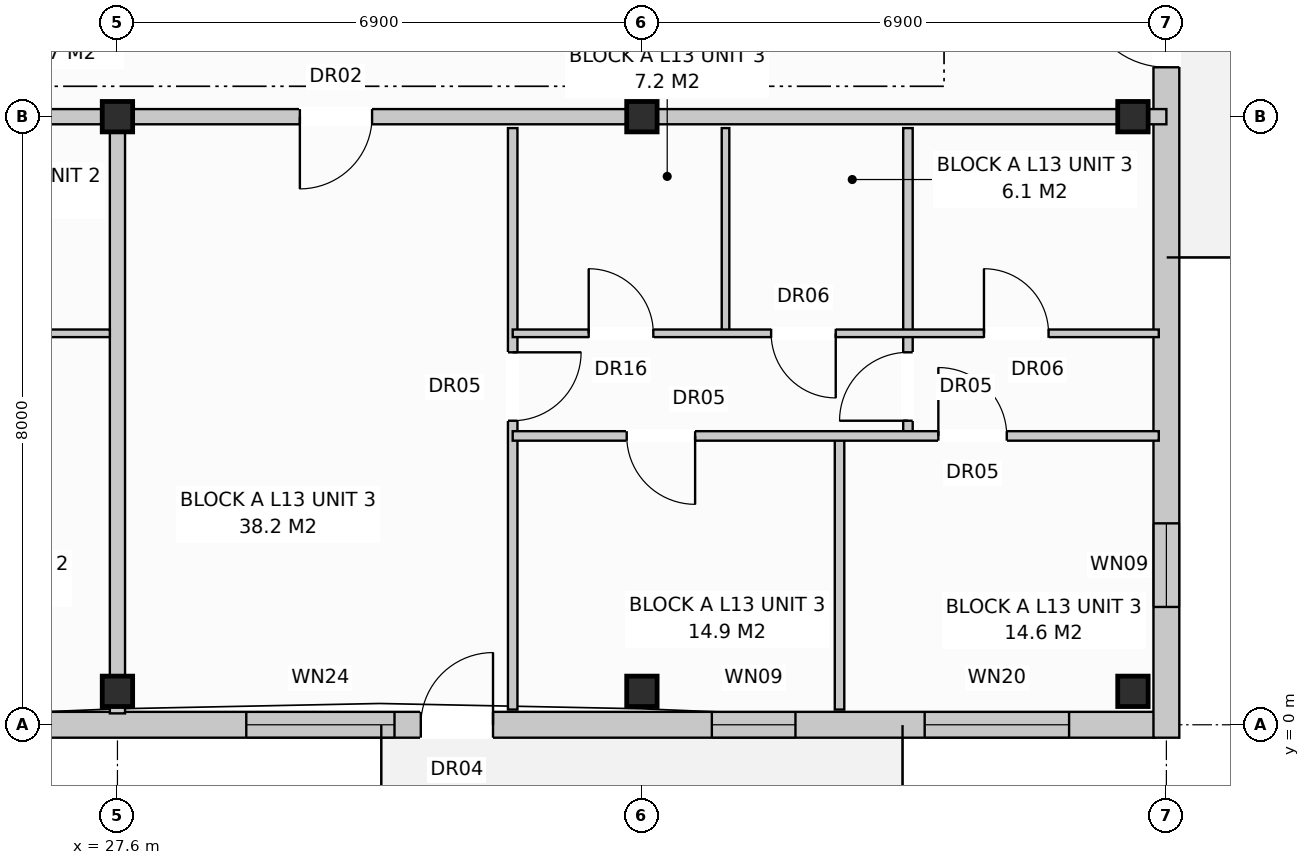
"""IFC4 building model, lengths in metres.
Left out: names, types, materials, properties, quantities, classifications, styles, units other than length and angle.
Written with IfcOpenShell. Run it as: python <this file> out.ifc"""

import sys

from ifc_helpers import new_model, si_unit, direction, frame, frame_2d, origin, origin_with_axes, origin_2d, place, context, subcontext, project, spatial, rectangle, extrude, element, fill, save


model = new_model("IFC4")
c1 = context("Model", 3, precision=1e-05, world=origin(), true_north=direction((0.0, 1.0)))
c2 = subcontext(c1, "Body", "Model", "MODEL_VIEW")
j1 = project(units=[si_unit("LENGTHUNIT", "METRE"), si_unit("PLANEANGLEUNIT", "RADIAN")], contexts=[c1])
p1 = place(None, origin())
s1 = spatial("IfcSite", under=j1, at=p1, CompositionType="ELEMENT")
p2 = place(p1, origin())
s2 = spatial("IfcBuilding", under=s1, at=p2, CompositionType="ELEMENT")
p3 = place(p2, frame((0.0, 0.0, 43.2)))
s3 = spatial("IfcBuildingStorey", under=s2, at=p3, CompositionType="ELEMENT", Elevation=43.2)
for number, where, z_axis, x_axis in (
    (1, (27.6, 0.44, 0.0), (0.0, 0.0, 1.0), (1.0, 0.0, 0.0)),
    (2, (27.6, 8.0, 0.0), (0.0, 0.0, 1.0), (1.0, 0.0, 0.0)),
    (3, (34.5, 0.44, 0.0), (0.0, 0.0, 1.0), (1.0, 0.0, 0.0)),
    (4, (34.5, 8.0, 0.0), (0.0, 0.0, 1.0), (1.0, 0.0, 0.0)),
    (5, (40.96, 0.44, 0.0), (0.0, 0.0, 1.0), (1.0, 0.0, 0.0)),
    (6, (40.96, 8.0, 0.0), (0.0, 0.0, 1.0), (1.0, 0.0, 0.0)),
):
    element("IfcColumn", number, at=place(p3, frame(where, z_axis=z_axis, x_axis=x_axis)), inside=s3, PredefinedType="COLUMN", context=c2, shape_type="SweptSolid", body=[
        extrude(rectangle(XDim=0.4, YDim=0.4, at=origin_2d()), origin(), (0.0, 0.0, 1.0), 3.2),
    ])
p4 = place(p3, frame((0.16, 0.0, 0.0), z_axis=(0.0, 0.0, 1.0), x_axis=(1.0, 0.0, 0.0)))
e7 = element("IfcWall", 7, at=p4, inside=s3, PredefinedType="STANDARD", context=c2, shape_type="SweptSolid", body=[
    extrude(rectangle(XDim=41.08, YDim=0.34, at=frame_2d((20.54, 0.0))), origin(), (0.0, 0.0, 1.0), 2.97),
])
p5 = place(p4, frame((5.11, 0.0, 0.0)))
e8 = element("IfcOpeningElement", 8, at=p5, cuts=e7, PredefinedType="OPENING", context=c2, shape_type="SweptSolid", body=[
    extrude(rectangle(XDim=0.95, YDim=2.1, at=frame_2d((0.475, 1.05))), frame((0.0, 0.182, 0.0), z_axis=(0.0, -1.0, 0.0), x_axis=(1.0, 0.0, 0.0)), (0.0, 0.0, 1.0), 0.364),
])
p6 = place(p4, frame((18.91, 0.0, 0.0)))
e9 = element("IfcOpeningElement", 9, at=p6, cuts=e7, PredefinedType="OPENING", context=c2, shape_type="SweptSolid", body=[
    extrude(rectangle(XDim=0.95, YDim=2.1, at=frame_2d((0.475, 1.05))), frame((0.0, 0.182, 0.0), z_axis=(0.0, -1.0, 0.0), x_axis=(1.0, 0.0, 0.0)), (0.0, 0.0, 1.0), 0.364),
])
p7 = place(p4, frame((31.431, 0.0, 0.0)))
e10 = element("IfcOpeningElement", 10, at=p7, cuts=e7, PredefinedType="OPENING", context=c2, shape_type="SweptSolid", body=[
    extrude(rectangle(XDim=0.95, YDim=2.1, at=frame_2d((0.475, 1.05))), frame((0.0, 0.182, 0.0), z_axis=(0.0, -1.0, 0.0), x_axis=(1.0, 0.0, 0.0)), (0.0, 0.0, 1.0), 0.364),
])
p8 = place(p4, frame((1.11, 0.0, 0.8)))
e11 = element("IfcOpeningElement", 11, at=p8, cuts=e7, PredefinedType="OPENING", context=c2, shape_type="SweptSolid", body=[
    extrude(rectangle(XDim=1.8, YDim=1.7, at=frame_2d((0.9, 0.85))), frame((0.0, 0.182, 0.0), z_axis=(0.0, -1.0, 0.0), x_axis=(1.0, 0.0, 0.0)), (0.0, 0.0, 1.0), 0.364),
])
p9 = place(p4, frame((9.36, 0.0, 0.72)))
e12 = element("IfcOpeningElement", 12, at=p9, cuts=e7, PredefinedType="OPENING", context=c2, shape_type="SweptSolid", body=[
    extrude(rectangle(XDim=1.1, YDim=1.5, at=frame_2d((0.55, 0.75))), frame((0.0, 0.182, 0.0), z_axis=(0.0, -1.0, 0.0), x_axis=(1.0, 0.0, 0.0)), (0.0, 0.0, 1.0), 0.364),
])
p10 = place(p4, frame((14.635, 0.0, 0.8)))
e13 = element("IfcOpeningElement", 13, at=p10, cuts=e7, PredefinedType="OPENING", context=c2, shape_type="SweptSolid", body=[
    extrude(rectangle(XDim=1.95, YDim=1.65, at=frame_2d((0.975, 0.825))), frame((0.0, 0.182, 0.0), z_axis=(0.0, -1.0, 0.0), x_axis=(1.0, 0.0, 0.0)), (0.0, 0.0, 1.0), 0.364),
])
p11 = place(p4, frame((21.46, 0.0, 0.72)))
e14 = element("IfcOpeningElement", 14, at=p11, cuts=e7, PredefinedType="OPENING", context=c2, shape_type="SweptSolid", body=[
    extrude(rectangle(XDim=1.1, YDim=1.5, at=frame_2d((0.55, 0.75))), frame((0.0, 0.182, 0.0), z_axis=(0.0, -1.0, 0.0), x_axis=(1.0, 0.0, 0.0)), (0.0, 0.0, 1.0), 0.364),
])
p12 = place(p4, frame((24.46, 0.0, 0.8)))
e15 = element("IfcOpeningElement", 15, at=p12, cuts=e7, PredefinedType="OPENING", context=c2, shape_type="SweptSolid", body=[
    extrude(rectangle(XDim=1.9, YDim=1.85, at=frame_2d((0.95, 0.925))), frame((0.0, 0.182, 0.0), z_axis=(0.0, -1.0, 0.0), x_axis=(1.0, 0.0, 0.0)), (0.0, 0.0, 1.0), 0.364),
])
p13 = place(p4, frame((29.135, 0.0, 0.8)))
e16 = element("IfcOpeningElement", 16, at=p13, cuts=e7, PredefinedType="OPENING", context=c2, shape_type="SweptSolid", body=[
    extrude(rectangle(XDim=1.95, YDim=1.65, at=frame_2d((0.975, 0.825))), frame((0.0, 0.182, 0.0), z_axis=(0.0, -1.0, 0.0), x_axis=(1.0, 0.0, 0.0)), (0.0, 0.0, 1.0), 0.364),
])
p14 = place(p4, frame((35.26, 0.0, 0.72)))
e17 = element("IfcOpeningElement", 17, at=p14, cuts=e7, PredefinedType="OPENING", context=c2, shape_type="SweptSolid", body=[
    extrude(rectangle(XDim=1.1, YDim=1.5, at=frame_2d((0.55, 0.75))), frame((0.0, 0.182, 0.0), z_axis=(0.0, -1.0, 0.0), x_axis=(1.0, 0.0, 0.0)), (0.0, 0.0, 1.0), 0.364),
])
p15 = place(p4, frame((38.06, 0.0, 0.8)))
e18 = element("IfcOpeningElement", 18, at=p15, cuts=e7, PredefinedType="OPENING", context=c2, shape_type="SweptSolid", body=[
    extrude(rectangle(XDim=1.9, YDim=1.85, at=frame_2d((0.95, 0.925))), frame((0.0, 0.182, 0.0), z_axis=(0.0, -1.0, 0.0), x_axis=(1.0, 0.0, 0.0)), (0.0, 0.0, 1.0), 0.364),
])
p16 = place(p3, frame((41.4, -0.17, 0.0), z_axis=(0.0, 0.0, 1.0), x_axis=(0.0, 1.0, 0.0)))
e19 = element("IfcWall", 19, at=p16, inside=s3, PredefinedType="STANDARD", context=c2, shape_type="SweptSolid", body=[
    extrude(rectangle(XDim=18.74, YDim=0.34, at=frame_2d((9.37, 0.0))), origin(), (0.0, 0.0, 1.0), 2.97),
])
p17 = place(p16, frame((8.82, 0.0, 0.0)))
e20 = element("IfcOpeningElement", 20, at=p17, cuts=e19, PredefinedType="OPENING", context=c2, shape_type="SweptSolid", body=[
    extrude(rectangle(XDim=1.1, YDim=2.1, at=frame_2d((0.55, 1.05))), frame((0.0, 0.182, 0.0), z_axis=(0.0, -1.0, 0.0), x_axis=(1.0, 0.0, 0.0)), (0.0, 0.0, 1.0), 0.364),
])
p18 = place(p16, frame((1.72, 0.0, 0.72)))
e21 = element("IfcOpeningElement", 21, at=p18, cuts=e19, PredefinedType="OPENING", context=c2, shape_type="SweptSolid", body=[
    extrude(rectangle(XDim=1.1, YDim=1.5, at=frame_2d((0.55, 0.75))), frame((0.0, 0.182, 0.0), z_axis=(0.0, -1.0, 0.0), x_axis=(1.0, 0.0, 0.0)), (0.0, 0.0, 1.0), 0.364),
])
p19 = place(p16, frame((15.92, 0.0, 0.72)))
e22 = element("IfcOpeningElement", 22, at=p19, cuts=e19, PredefinedType="OPENING", context=c2, shape_type="SweptSolid", body=[
    extrude(rectangle(XDim=1.1, YDim=1.5, at=frame_2d((0.55, 0.75))), frame((0.0, 0.182, 0.0), z_axis=(0.0, -1.0, 0.0), x_axis=(1.0, 0.0, 0.0)), (0.0, 0.0, 1.0), 0.364),
])
p20 = place(p3, frame((27.6, 7.85, 0.0), z_axis=(0.0, 0.0, 1.0), x_axis=(0.0, -1.0, 0.0)))
e23 = element("IfcWall", 23, at=p20, inside=s3, PredefinedType="PARTITIONING", context=c2, shape_type="SweptSolid", body=[
    extrude(rectangle(XDim=7.7, YDim=0.2, at=frame_2d((3.85, 0.0))), origin(), (0.0, 0.0, 1.0), 2.97),
])
p21 = place(p3, frame((6.9, 8.0, 0.0), z_axis=(0.0, 0.0, 1.0), x_axis=(1.0, 0.0, 0.0)))
e24 = element("IfcWall", 24, at=p21, inside=s3, PredefinedType="PARTITIONING", context=c2, shape_type="SweptSolid", body=[
    extrude(rectangle(XDim=20.7, YDim=0.2, at=frame_2d((10.35, 0.0))), origin(), (0.0, 0.0, 1.0), 2.41),
])
p22 = place(p21, frame((2.4, 0.0, 0.0)))
e25 = element("IfcOpeningElement", 25, at=p22, cuts=e24, PredefinedType="OPENING", context=c2, shape_type="SweptSolid", body=[
    extrude(rectangle(XDim=0.95, YDim=2.15, at=frame_2d((0.475, 1.075))), frame((0.0, 0.112, 0.0), z_axis=(0.0, -1.0, 0.0), x_axis=(1.0, 0.0, 0.0)), (0.0, 0.0, 1.0), 0.224),
])
p23 = place(p3, frame((13.2, 5.15, 0.0), z_axis=(0.0, 0.0, 1.0), x_axis=(1.0, 0.0, 0.0)))
e26 = element("IfcWall", 26, at=p23, inside=s3, PredefinedType="PARTITIONING", context=c2, shape_type="SweptSolid", body=[
    extrude(rectangle(XDim=14.3, YDim=0.1, at=frame_2d((7.15, 0.0))), origin(), (0.0, 0.0, 1.0), 2.97),
])
p24 = place(p23, frame((1.6, 0.0, 0.0)))
e27 = element("IfcOpeningElement", 27, at=p24, cuts=e26, PredefinedType="OPENING", context=c2, shape_type="SweptSolid", body=[
    extrude(rectangle(XDim=0.9, YDim=2.1, at=frame_2d((0.45, 1.05))), frame((0.0, 0.062, 0.0), z_axis=(0.0, -1.0, 0.0), x_axis=(1.0, 0.0, 0.0)), (0.0, 0.0, 1.0), 0.124),
])
p25 = place(p23, frame((5.1, 0.0, 0.0)))
e28 = element("IfcOpeningElement", 28, at=p25, cuts=e26, PredefinedType="OPENING", context=c2, shape_type="SweptSolid", body=[
    extrude(rectangle(XDim=0.85, YDim=2.05, at=frame_2d((0.425, 1.025))), frame((0.0, 0.062, 0.0), z_axis=(0.0, -1.0, 0.0), x_axis=(1.0, 0.0, 0.0)), (0.0, 0.0, 1.0), 0.124),
])
p26 = place(p23, frame((8.2, 0.0, 0.0)))
e29 = element("IfcOpeningElement", 29, at=p26, cuts=e26, PredefinedType="OPENING", context=c2, shape_type="SweptSolid", body=[
    extrude(rectangle(XDim=0.85, YDim=2.05, at=frame_2d((0.425, 1.025))), frame((0.0, 0.062, 0.0), z_axis=(0.0, -1.0, 0.0), x_axis=(1.0, 0.0, 0.0)), (0.0, 0.0, 1.0), 0.124),
])
p27 = place(p23, frame((11.6, 0.0, 0.0)))
e30 = element("IfcOpeningElement", 30, at=p27, cuts=e26, PredefinedType="OPENING", context=c2, shape_type="SweptSolid", body=[
    extrude(rectangle(XDim=0.85, YDim=2.05, at=frame_2d((0.425, 1.025))), frame((0.0, 0.062, 0.0), z_axis=(0.0, -1.0, 0.0), x_axis=(1.0, 0.0, 0.0)), (0.0, 0.0, 1.0), 0.124),
])
p28 = place(p3, frame((27.6, 8.0, 0.0), z_axis=(0.0, 0.0, 1.0), x_axis=(1.0, 0.0, 0.0)))
e31 = element("IfcWall", 31, at=p28, inside=s3, PredefinedType="PARTITIONING", context=c2, shape_type="SweptSolid", body=[
    extrude(rectangle(XDim=13.8, YDim=0.2, at=frame_2d((6.9, 0.0))), origin(), (0.0, 0.0, 1.0), 2.41),
])
p29 = place(p28, frame((2.4, 0.0, 0.0)))
e32 = element("IfcOpeningElement", 32, at=p29, cuts=e31, PredefinedType="OPENING", context=c2, shape_type="SweptSolid", body=[
    extrude(rectangle(XDim=0.95, YDim=2.15, at=frame_2d((0.475, 1.075))), frame((0.0, 0.112, 0.0), z_axis=(0.0, -1.0, 0.0), x_axis=(1.0, 0.0, 0.0)), (0.0, 0.0, 1.0), 0.224),
])
p30 = place(p3, frame((32.8, 7.85, 0.0), z_axis=(0.0, 0.0, 1.0), x_axis=(0.0, -1.0, 0.0)))
e33 = element("IfcWall", 33, at=p30, inside=s3, PredefinedType="PARTITIONING", context=c2, shape_type="SweptSolid", body=[
    extrude(rectangle(XDim=7.65, YDim=0.125, at=frame_2d((3.825, 0.0))), origin(), (0.0, 0.0, 1.0), 2.97),
])
p31 = place(p30, frame((2.95, 0.0, 0.0)))
e34 = element("IfcOpeningElement", 34, at=p31, cuts=e33, PredefinedType="OPENING", context=c2, shape_type="SweptSolid", body=[
    extrude(rectangle(XDim=0.9, YDim=2.1, at=frame_2d((0.45, 1.05))), frame((0.0, 0.074, 0.0), z_axis=(0.0, -1.0, 0.0), x_axis=(1.0, 0.0, 0.0)), (0.0, 0.0, 1.0), 0.149),
])
p32 = place(p3, frame((35.6, 7.85, 0.0), z_axis=(0.0, 0.0, 1.0), x_axis=(0.0, -1.0, 0.0)))
e35 = element("IfcWall", 35, at=p32, inside=s3, PredefinedType="PARTITIONING", context=c2, shape_type="SweptSolid", body=[
    extrude(rectangle(XDim=2.7, YDim=0.1, at=frame_2d((1.35, 0.0))), origin(), (0.0, 0.0, 1.0), 2.97),
])
p33 = place(p3, frame((38.0, 7.85, 0.0), z_axis=(0.0, 0.0, 1.0), x_axis=(0.0, -1.0, 0.0)))
e36 = element("IfcWall", 36, at=p33, inside=s3, PredefinedType="PARTITIONING", context=c2, shape_type="SweptSolid", body=[
    extrude(rectangle(XDim=4.05, YDim=0.125, at=frame_2d((2.025, 0.0))), origin(), (0.0, 0.0, 1.0), 2.97),
])
p34 = place(p33, frame((2.95, 0.0, 0.0)))
e37 = element("IfcOpeningElement", 37, at=p34, cuts=e36, PredefinedType="OPENING", context=c2, shape_type="SweptSolid", body=[
    extrude(rectangle(XDim=0.9, YDim=2.1, at=frame_2d((0.45, 1.05))), frame((0.0, 0.074, 0.0), z_axis=(0.0, -1.0, 0.0), x_axis=(1.0, 0.0, 0.0)), (0.0, 0.0, 1.0), 0.149),
])
p35 = place(p3, frame((37.1, 3.8, 0.0), z_axis=(0.0, 0.0, 1.0), x_axis=(0.0, -1.0, 0.0)))
e38 = element("IfcWall", 38, at=p35, inside=s3, PredefinedType="PARTITIONING", context=c2, shape_type="SweptSolid", body=[
    extrude(rectangle(XDim=3.6, YDim=0.125, at=frame_2d((1.8, 0.0))), origin(), (0.0, 0.0, 1.0), 2.59),
])
p36 = place(p3, frame((32.8, 5.15, 0.0), z_axis=(0.0, 0.0, 1.0), x_axis=(1.0, 0.0, 0.0)))
e39 = element("IfcWall", 39, at=p36, inside=s3, PredefinedType="PARTITIONING", context=c2, shape_type="SweptSolid", body=[
    extrude(rectangle(XDim=8.5, YDim=0.1, at=frame_2d((4.25, 0.0))), origin(), (0.0, 0.0, 1.0), 2.97),
])
p37 = place(p36, frame((1.0, 0.0, 0.0)))
e40 = element("IfcOpeningElement", 40, at=p37, cuts=e39, PredefinedType="OPENING", context=c2, shape_type="SweptSolid", body=[
    extrude(rectangle(XDim=0.85, YDim=2.1, at=frame_2d((0.425, 1.05))), frame((0.0, 0.062, 0.0), z_axis=(0.0, -1.0, 0.0), x_axis=(1.0, 0.0, 0.0)), (0.0, 0.0, 1.0), 0.124),
])
p38 = place(p36, frame((3.4, 0.0, 0.0)))
e41 = element("IfcOpeningElement", 41, at=p38, cuts=e39, PredefinedType="OPENING", context=c2, shape_type="SweptSolid", body=[
    extrude(rectangle(XDim=0.85, YDim=2.05, at=frame_2d((0.425, 1.025))), frame((0.0, 0.062, 0.0), z_axis=(0.0, -1.0, 0.0), x_axis=(1.0, 0.0, 0.0)), (0.0, 0.0, 1.0), 0.124),
])
p39 = place(p36, frame((6.2, 0.0, 0.0)))
e42 = element("IfcOpeningElement", 42, at=p39, cuts=e39, PredefinedType="OPENING", context=c2, shape_type="SweptSolid", body=[
    extrude(rectangle(XDim=0.85, YDim=2.05, at=frame_2d((0.425, 1.025))), frame((0.0, 0.062, 0.0), z_axis=(0.0, -1.0, 0.0), x_axis=(1.0, 0.0, 0.0)), (0.0, 0.0, 1.0), 0.124),
])
p40 = place(p3, frame((32.8, 3.8, 0.0), z_axis=(0.0, 0.0, 1.0), x_axis=(1.0, 0.0, 0.0)))
e43 = element("IfcWall", 43, at=p40, inside=s3, PredefinedType="PARTITIONING", context=c2, shape_type="SweptSolid", body=[
    extrude(rectangle(XDim=8.5, YDim=0.125, at=frame_2d((4.25, 0.0))), origin(), (0.0, 0.0, 1.0), 2.97),
])
p41 = place(p40, frame((1.5, 0.0, 0.0)))
e44 = element("IfcOpeningElement", 44, at=p41, cuts=e43, PredefinedType="OPENING", context=c2, shape_type="SweptSolid", body=[
    extrude(rectangle(XDim=0.9, YDim=2.1, at=frame_2d((0.45, 1.05))), frame((0.0, 0.074, 0.0), z_axis=(0.0, -1.0, 0.0), x_axis=(1.0, 0.0, 0.0)), (0.0, 0.0, 1.0), 0.149),
])
p42 = place(p40, frame((5.6, 0.0, 0.0)))
e45 = element("IfcOpeningElement", 45, at=p42, cuts=e43, PredefinedType="OPENING", context=c2, shape_type="SweptSolid", body=[
    extrude(rectangle(XDim=0.9, YDim=2.1, at=frame_2d((0.45, 1.05))), frame((0.0, 0.074, 0.0), z_axis=(0.0, -1.0, 0.0), x_axis=(1.0, 0.0, 0.0)), (0.0, 0.0, 1.0), 0.149),
])
p43 = place(p7, origin_with_axes())
e46 = element("IfcDoor", 46, at=p43, inside=s3, OperationType="SINGLE_SWING_RIGHT", PredefinedType="DOOR", context=c2, shape_type="SweptSolid", body=[
    extrude(rectangle(XDim=0.95, YDim=2.1, at=frame_2d((0.475, 1.05))), frame((0.0, 0.025, 0.0), z_axis=(0.0, -1.0, 0.0), x_axis=(1.0, 0.0, 0.0)), (0.0, 0.0, 1.0), 0.05),
])
fill(e10, e46)
p44 = place(p13, origin_with_axes())
e47 = element("IfcWindow", 47, at=p44, inside=s3, PartitioningType="SINGLE_PANEL", PredefinedType="WINDOW", context=c2, shape_type="SweptSolid", body=[
    extrude(rectangle(XDim=1.95, YDim=1.65, at=frame_2d((0.975, 0.825))), frame((0.0, 0.03, 0.0), z_axis=(0.0, -1.0, 0.0), x_axis=(1.0, 0.0, 0.0)), (0.0, 0.0, 1.0), 0.06),
])
fill(e16, e47)
p45 = place(p14, origin_with_axes())
e48 = element("IfcWindow", 48, at=p45, inside=s3, PartitioningType="SINGLE_PANEL", PredefinedType="WINDOW", context=c2, shape_type="SweptSolid", body=[
    extrude(rectangle(XDim=1.1, YDim=1.5, at=frame_2d((0.55, 0.75))), frame((0.0, 0.03, 0.0), z_axis=(0.0, -1.0, 0.0), x_axis=(1.0, 0.0, 0.0)), (0.0, 0.0, 1.0), 0.06),
])
fill(e17, e48)
p46 = place(p15, origin_with_axes())
e49 = element("IfcWindow", 49, at=p46, inside=s3, PartitioningType="SINGLE_PANEL", PredefinedType="WINDOW", context=c2, shape_type="SweptSolid", body=[
    extrude(rectangle(XDim=1.9, YDim=1.85, at=frame_2d((0.95, 0.925))), frame((0.0, 0.03, 0.0), z_axis=(0.0, -1.0, 0.0), x_axis=(1.0, 0.0, 0.0)), (0.0, 0.0, 1.0), 0.06),
])
fill(e18, e49)
p47 = place(p17, origin_with_axes())
e50 = element("IfcDoor", 50, at=p47, inside=s3, OperationType="SINGLE_SWING_RIGHT", PredefinedType="DOOR", context=c2, shape_type="SweptSolid", body=[
    extrude(rectangle(XDim=1.1, YDim=2.1, at=frame_2d((0.55, 1.05))), frame((0.0, 0.025, 0.0), z_axis=(0.0, -1.0, 0.0), x_axis=(1.0, 0.0, 0.0)), (0.0, 0.0, 1.0), 0.05),
])
fill(e20, e50)
p48 = place(p18, origin_with_axes())
e51 = element("IfcWindow", 51, at=p48, inside=s3, PartitioningType="SINGLE_PANEL", PredefinedType="WINDOW", context=c2, shape_type="SweptSolid", body=[
    extrude(rectangle(XDim=1.1, YDim=1.5, at=frame_2d((0.55, 0.75))), frame((0.0, 0.03, 0.0), z_axis=(0.0, -1.0, 0.0), x_axis=(1.0, 0.0, 0.0)), (0.0, 0.0, 1.0), 0.06),
])
fill(e21, e51)
p49 = place(p29, frame((0.95, 0.0, 0.0), z_axis=(0.0, 0.0, 1.0), x_axis=(-1.0, 0.0, 0.0)))
e52 = element("IfcDoor", 52, at=p49, inside=s3, OperationType="SINGLE_SWING_LEFT", PredefinedType="DOOR", context=c2, shape_type="SweptSolid", body=[
    extrude(rectangle(XDim=0.95, YDim=2.15, at=frame_2d((0.475, 1.075))), frame((0.0, 0.025, 0.0), z_axis=(0.0, -1.0, 0.0), x_axis=(1.0, 0.0, 0.0)), (0.0, 0.0, 1.0), 0.05),
])
fill(e32, e52)
p50 = place(p31, origin_with_axes())
e53 = element("IfcDoor", 53, at=p50, inside=s3, OperationType="SINGLE_SWING_LEFT", PredefinedType="DOOR", context=c2, shape_type="SweptSolid", body=[
    extrude(rectangle(XDim=0.9, YDim=2.1, at=frame_2d((0.45, 1.05))), frame((0.0, 0.025, 0.0), z_axis=(0.0, -1.0, 0.0), x_axis=(1.0, 0.0, 0.0)), (0.0, 0.0, 1.0), 0.05),
])
fill(e34, e53)
p51 = place(p34, frame((0.9, 0.0, 0.0), z_axis=(0.0, 0.0, 1.0), x_axis=(-1.0, 0.0, 0.0)))
e54 = element("IfcDoor", 54, at=p51, inside=s3, OperationType="SINGLE_SWING_RIGHT", PredefinedType="DOOR", context=c2, shape_type="SweptSolid", body=[
    extrude(rectangle(XDim=0.9, YDim=2.1, at=frame_2d((0.45, 1.05))), frame((0.0, 0.025, 0.0), z_axis=(0.0, -1.0, 0.0), x_axis=(1.0, 0.0, 0.0)), (0.0, 0.0, 1.0), 0.05),
])
fill(e37, e54)
p52 = place(p37, origin_with_axes())
e55 = element("IfcDoor", 55, at=p52, inside=s3, OperationType="SINGLE_SWING_LEFT", PredefinedType="DOOR", context=c2, shape_type="SweptSolid", body=[
    extrude(rectangle(XDim=0.85, YDim=2.1, at=frame_2d((0.425, 1.05))), frame((0.0, 0.025, 0.0), z_axis=(0.0, -1.0, 0.0), x_axis=(1.0, 0.0, 0.0)), (0.0, 0.0, 1.0), 0.05),
])
fill(e40, e55)
p53 = place(p38, frame((0.85, 0.0, 0.0), z_axis=(0.0, 0.0, 1.0), x_axis=(-1.0, 0.0, 0.0)))
e56 = element("IfcDoor", 56, at=p53, inside=s3, OperationType="SINGLE_SWING_RIGHT", PredefinedType="DOOR", context=c2, shape_type="SweptSolid", body=[
    extrude(rectangle(XDim=0.85, YDim=2.05, at=frame_2d((0.425, 1.025))), frame((0.0, 0.025, 0.0), z_axis=(0.0, -1.0, 0.0), x_axis=(1.0, 0.0, 0.0)), (0.0, 0.0, 1.0), 0.05),
])
fill(e41, e56)
p54 = place(p39, origin_with_axes())
e57 = element("IfcDoor", 57, at=p54, inside=s3, OperationType="SINGLE_SWING_LEFT", PredefinedType="DOOR", context=c2, shape_type="SweptSolid", body=[
    extrude(rectangle(XDim=0.85, YDim=2.05, at=frame_2d((0.425, 1.025))), frame((0.0, 0.025, 0.0), z_axis=(0.0, -1.0, 0.0), x_axis=(1.0, 0.0, 0.0)), (0.0, 0.0, 1.0), 0.05),
])
fill(e42, e57)
p55 = place(p41, frame((0.9, 0.0, 0.0), z_axis=(0.0, 0.0, 1.0), x_axis=(-1.0, 0.0, 0.0)))
e58 = element("IfcDoor", 58, at=p55, inside=s3, OperationType="SINGLE_SWING_RIGHT", PredefinedType="DOOR", context=c2, shape_type="SweptSolid", body=[
    extrude(rectangle(XDim=0.9, YDim=2.1, at=frame_2d((0.45, 1.05))), frame((0.0, 0.025, 0.0), z_axis=(0.0, -1.0, 0.0), x_axis=(1.0, 0.0, 0.0)), (0.0, 0.0, 1.0), 0.05),
])
fill(e44, e58)
p56 = place(p42, origin_with_axes())
e59 = element("IfcDoor", 59, at=p56, inside=s3, OperationType="SINGLE_SWING_LEFT", PredefinedType="DOOR", context=c2, shape_type="SweptSolid", body=[
    extrude(rectangle(XDim=0.9, YDim=2.1, at=frame_2d((0.45, 1.05))), frame((0.0, 0.025, 0.0), z_axis=(0.0, -1.0, 0.0), x_axis=(1.0, 0.0, 0.0)), (0.0, 0.0, 1.0), 0.05),
])
fill(e45, e59)
save(model, sys.argv[1])
